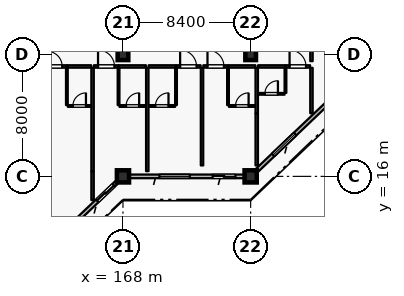
"""IFC4 building model, lengths in metres.
Left out: names, types, materials, properties, quantities, classifications, styles, units other than length and angle.
Written with IfcOpenShell. Run it as: python <this file> out.ifc"""

import sys

from ifc_helpers import new_model, si_unit, direction, frame, frame_2d, origin, origin_2d, place, context, subcontext, project, spatial, rectangle, extrude, element, fill, save


model = new_model("IFC4")
c1 = context("Model", 3, precision=1e-05, world=origin(), true_north=direction((0.0, 1.0)))
c2 = subcontext(c1, "Body", "Model", "MODEL_VIEW")
j1 = project(units=[si_unit("LENGTHUNIT", "METRE"), si_unit("PLANEANGLEUNIT", "RADIAN")], contexts=[c1])
p1 = place(None, origin())
s1 = spatial("IfcSite", under=j1, at=p1, CompositionType="ELEMENT")
p2 = place(p1, origin())
s2 = spatial("IfcBuilding", under=s1, at=p2, CompositionType="ELEMENT")
p3 = place(p2, frame((0.0, 0.0, 25.2)))
s3 = spatial("IfcBuildingStorey", under=s2, at=p3, CompositionType="ELEMENT", Elevation=25.2)
for number, where, z_axis, x_axis in (
    (1, (168.0, 16.0, 0.0), (0.0, 0.0, 1.0), (1.0, 0.0, 0.0)),
    (2, (176.4, 16.0, 0.0), (0.0, 0.0, 1.0), (1.0, 0.0, 0.0)),
):
    element("IfcColumn", number, at=place(p3, frame(where, z_axis=z_axis, x_axis=x_axis)), inside=s3, PredefinedType="COLUMN", context=c2, shape_type="SweptSolid", body=[
        extrude(rectangle(XDim=0.8, YDim=0.8, at=origin_2d()), origin(), (0.0, 0.0, 1.0), 3.6),
    ])
for number, where, z_axis, x_axis in (
    (3, (168.0, 24.0, 0.0), (0.0, 0.0, 1.0), (1.0, 0.0, 0.0)),
    (4, (176.4, 24.0, 0.0), (0.0, 0.0, 1.0), (1.0, 0.0, 0.0)),
):
    element("IfcColumn", number, at=place(p3, frame(where, z_axis=z_axis, x_axis=x_axis)), inside=s3, PredefinedType="COLUMN", context=c2, shape_type="SweptSolid", body=[
        extrude(rectangle(XDim=0.7, YDim=0.7, at=origin_2d()), origin(), (0.0, 0.0, 1.0), 3.6),
    ])
p4 = place(p3, frame((167.6, 15.619, 0.0), z_axis=(0.0, 0.0, 1.0), x_axis=(-0.724156739794, -0.689635422677, 0.0)))
e5 = element("IfcWall", 5, at=p4, inside=s3, PredefinedType="SOLIDWALL", context=c2, shape_type="SweptSolid", body=[
    extrude(rectangle(XDim=10.495, YDim=0.24, at=frame_2d((5.248, 0.0))), origin(), (0.0, 0.0, 1.0), 2.93),
])
p5 = place(p4, frame((0.286, 0.0, 0.0)))
e6 = element("IfcOpeningElement", 6, at=p5, cuts=e5, PredefinedType="OPENING", context=c2, shape_type="SweptSolid", body=[
    extrude(rectangle(XDim=1.5, YDim=2.25, at=frame_2d((0.75, 1.125))), frame((0.0, 0.13, 0.0), z_axis=(0.0, -1.0, 0.0), x_axis=(1.0, 0.0, 0.0)), (0.0, 0.0, 1.0), 0.26),
])
p6 = place(p4, frame((3.757, 0.0, 0.8)))
e7 = element("IfcOpeningElement", 7, at=p6, cuts=e5, PredefinedType="OPENING", context=c2, shape_type="SweptSolid", body=[
    extrude(rectangle(XDim=1.6, YDim=1.6, at=frame_2d((0.8, 0.8))), frame((0.0, 0.13, 0.0), z_axis=(0.0, -1.0, 0.0), x_axis=(1.0, 0.0, 0.0)), (0.0, 0.0, 1.0), 0.26),
])
p7 = place(p4, frame((7.969, 0.0, 0.8)))
e8 = element("IfcOpeningElement", 8, at=p7, cuts=e5, PredefinedType="OPENING", context=c2, shape_type="SweptSolid", body=[
    extrude(rectangle(XDim=1.6, YDim=1.6, at=frame_2d((0.8, 0.8))), frame((0.0, 0.13, 0.0), z_axis=(0.0, -1.0, 0.0), x_axis=(1.0, 0.0, 0.0)), (0.0, 0.0, 1.0), 0.26),
])
p8 = place(p3, frame((176.0, 16.0, 0.0), z_axis=(0.0, 0.0, 1.0), x_axis=(-1.0, 0.0, 0.0)))
e9 = element("IfcWall", 9, at=p8, inside=s3, PredefinedType="SOLIDWALL", context=c2, shape_type="SweptSolid", body=[
    extrude(rectangle(XDim=7.6, YDim=0.24, at=frame_2d((3.8, 0.0))), origin(), (0.0, 0.0, 1.0), 2.89),
])
p9 = place(p8, frame((0.6, 0.0, 0.0)))
e10 = element("IfcOpeningElement", 10, at=p9, cuts=e9, PredefinedType="OPENING", context=c2, shape_type="SweptSolid", body=[
    extrude(rectangle(XDim=1.5, YDim=2.25, at=frame_2d((0.75, 1.125))), frame((0.0, 0.13, 0.0), z_axis=(0.0, -1.0, 0.0), x_axis=(1.0, 0.0, 0.0)), (0.0, 0.0, 1.0), 0.26),
])
p10 = place(p8, frame((3.6, 0.0, 0.8)))
e11 = element("IfcOpeningElement", 11, at=p10, cuts=e9, PredefinedType="OPENING", context=c2, shape_type="SweptSolid", body=[
    extrude(rectangle(XDim=2.0, YDim=1.75, at=frame_2d((1.0, 0.875))), frame((0.0, 0.13, 0.0), z_axis=(0.0, -1.0, 0.0), x_axis=(1.0, 0.0, 0.0)), (0.0, 0.0, 1.0), 0.26),
])
p11 = place(p3, frame((184.4, 23.619, 0.0), z_axis=(0.0, 0.0, 1.0), x_axis=(-0.724145676014, -0.689647040094, 0.0)))
e12 = element("IfcWall", 12, at=p11, inside=s3, PredefinedType="SOLIDWALL", context=c2, shape_type="SweptSolid", body=[
    extrude(rectangle(XDim=10.495, YDim=0.24, at=frame_2d((5.248, 0.0))), origin(), (0.0, 0.0, 1.0), 2.89),
])
p12 = place(p11, frame((2.288, 0.0, 0.0)))
e13 = element("IfcOpeningElement", 13, at=p12, cuts=e12, PredefinedType="OPENING", context=c2, shape_type="SweptSolid", body=[
    extrude(rectangle(XDim=1.5, YDim=2.25, at=frame_2d((0.75, 1.125))), frame((0.0, 0.13, 0.0), z_axis=(0.0, -1.0, 0.0), x_axis=(1.0, 0.0, 0.0)), (0.0, 0.0, 1.0), 0.26),
])
p13 = place(p11, frame((7.009, 0.0, 0.8)))
e14 = element("IfcOpeningElement", 14, at=p13, cuts=e12, PredefinedType="OPENING", context=c2, shape_type="SweptSolid", body=[
    extrude(rectangle(XDim=2.0, YDim=1.75, at=frame_2d((1.0, 0.875))), frame((0.0, 0.13, 0.0), z_axis=(0.0, -1.0, 0.0), x_axis=(1.0, 0.0, 0.0)), (0.0, 0.0, 1.0), 0.26),
])
p14 = place(p3, frame((162.69, 23.23, 0.0), z_axis=(0.0, 0.0, 1.0), x_axis=(1.0, 0.0, 0.0)))
e15 = element("IfcWall", 15, at=p14, inside=s3, PredefinedType="PARTITIONING", context=c2, shape_type="SweptSolid", body=[
    extrude(rectangle(XDim=1.62, YDim=0.16, at=frame_2d((0.81, 0.0))), origin(), (0.0, 0.0, 1.0), 3.335),
])
p15 = place(p14, frame((0.31, 0.0, 0.0)))
e16 = element("IfcOpeningElement", 16, at=p15, cuts=e15, PredefinedType="OPENING", context=c2, shape_type="SweptSolid", body=[
    extrude(rectangle(XDim=1.0, YDim=2.25, at=frame_2d((0.5, 1.125))), frame((0.0, 0.09, 0.0), z_axis=(0.0, -1.0, 0.0), x_axis=(1.0, 0.0, 0.0)), (0.0, 0.0, 1.0), 0.18),
])
p16 = place(p3, frame((164.32, 23.23, 0.0), z_axis=(0.0, 0.0, 1.0), x_axis=(1.0, 0.0, 0.0)))
e17 = element("IfcWall", 17, at=p16, inside=s3, PredefinedType="PARTITIONING", context=c2, shape_type="SweptSolid", body=[
    extrude(rectangle(XDim=1.59, YDim=0.16, at=frame_2d((0.795, 0.0))), origin(), (0.0, 0.0, 1.0), 3.335),
])
p17 = place(p3, frame((164.31, 20.69, 0.0), z_axis=(0.0, 0.0, 1.0), x_axis=(0.0, 1.0, 0.0)))
e18 = element("IfcWall", 18, at=p17, inside=s3, PredefinedType="PARTITIONING", context=c2, shape_type="SweptSolid", body=[
    extrude(rectangle(XDim=2.45, YDim=0.115, at=frame_2d((1.225, 0.0))), origin(), (0.0, 0.0, 1.0), 3.335),
])
p18 = place(p3, frame((164.37, 20.63, 0.0), z_axis=(0.0, 0.0, 1.0), x_axis=(1.0, 0.0, 0.0)))
e19 = element("IfcWall", 19, at=p18, inside=s3, PredefinedType="PARTITIONING", context=c2, shape_type="SweptSolid", body=[
    extrude(rectangle(XDim=1.53, YDim=0.115, at=frame_2d((0.765, 0.0))), origin(), (0.0, 0.0, 1.0), 3.335),
])
p19 = place(p18, frame((0.335, 0.0, 0.0)))
e20 = element("IfcOpeningElement", 20, at=p19, cuts=e19, PredefinedType="OPENING", context=c2, shape_type="SweptSolid", body=[
    extrude(rectangle(XDim=0.86, YDim=2.12, at=frame_2d((0.43, 1.06))), frame((0.0, 0.067, 0.0), z_axis=(0.0, -1.0, 0.0), x_axis=(1.0, 0.0, 0.0)), (0.0, 0.0, 1.0), 0.135),
])
p20 = place(p3, frame((166.0, 14.44, 0.0), z_axis=(0.0, 0.0, 1.0), x_axis=(0.0, 1.0, 0.0)))
e21 = element("IfcWall", 21, at=p20, inside=s3, PredefinedType="PARTITIONING", context=c2, shape_type="SweptSolid", body=[
    extrude(rectangle(XDim=1.89, YDim=0.16, at=frame_2d((0.945, 0.0))), origin(), (0.0, 0.0, 1.0), 3.335),
])
p21 = place(p3, frame((166.09, 23.23, 0.0), z_axis=(0.0, 0.0, 1.0), x_axis=(1.0, 0.0, 0.0)))
e22 = element("IfcWall", 22, at=p21, inside=s3, PredefinedType="PARTITIONING", context=c2, shape_type="SweptSolid", body=[
    extrude(rectangle(XDim=1.62, YDim=0.16, at=frame_2d((0.81, 0.0))), origin(), (0.0, 0.0, 1.0), 3.335),
])
p22 = place(p21, frame((0.27, 0.0, 0.0)))
e23 = element("IfcOpeningElement", 23, at=p22, cuts=e22, PredefinedType="OPENING", context=c2, shape_type="SweptSolid", body=[
    extrude(rectangle(XDim=1.08, YDim=2.3, at=frame_2d((0.54, 1.15))), frame((0.0, 0.09, 0.0), z_axis=(0.0, -1.0, 0.0), x_axis=(1.0, 0.0, 0.0)), (0.0, 0.0, 1.0), 0.18),
])
p23 = place(p3, frame((167.72, 23.23, 0.0), z_axis=(0.0, 0.0, 1.0), x_axis=(1.0, 0.0, 0.0)))
e24 = element("IfcWall", 24, at=p23, inside=s3, PredefinedType="PARTITIONING", context=c2, shape_type="SweptSolid", body=[
    extrude(rectangle(XDim=1.79, YDim=0.16, at=frame_2d((0.895, 0.0))), origin(), (0.0, 0.0, 1.0), 3.335),
])
p24 = place(p3, frame((167.71, 20.69, 0.0), z_axis=(0.0, 0.0, 1.0), x_axis=(0.0, 1.0, 0.0)))
e25 = element("IfcWall", 25, at=p24, inside=s3, PredefinedType="PARTITIONING", context=c2, shape_type="SweptSolid", body=[
    extrude(rectangle(XDim=2.45, YDim=0.115, at=frame_2d((1.225, 0.0))), origin(), (0.0, 0.0, 1.0), 3.335),
])
p25 = place(p3, frame((167.77, 20.63, 0.0), z_axis=(0.0, 0.0, 1.0), x_axis=(1.0, 0.0, 0.0)))
e26 = element("IfcWall", 26, at=p25, inside=s3, PredefinedType="PARTITIONING", context=c2, shape_type="SweptSolid", body=[
    extrude(rectangle(XDim=1.73, YDim=0.115, at=frame_2d((0.865, 0.0))), origin(), (0.0, 0.0, 1.0), 3.335),
])
p26 = place(p25, frame((0.435, 0.0, 0.0)))
e27 = element("IfcOpeningElement", 27, at=p26, cuts=e26, PredefinedType="OPENING", context=c2, shape_type="SweptSolid", body=[
    extrude(rectangle(XDim=0.86, YDim=2.12, at=frame_2d((0.43, 1.06))), frame((0.0, 0.067, 0.0), z_axis=(0.0, -1.0, 0.0), x_axis=(1.0, 0.0, 0.0)), (0.0, 0.0, 1.0), 0.135),
])
p27 = place(p3, frame((166.0, 16.34, 0.0), z_axis=(0.0, 0.0, 1.0), x_axis=(0.0, 1.0, 0.0)))
e28 = element("IfcWall", 28, at=p27, inside=s3, PredefinedType="PARTITIONING", context=c2, shape_type="SweptSolid", body=[
    extrude(rectangle(XDim=6.8, YDim=0.16, at=frame_2d((3.4, 0.0))), origin(), (0.0, 0.0, 1.0), 3.335),
])
p28 = place(p3, frame((169.69, 23.23, 0.0), z_axis=(0.0, 0.0, 1.0), x_axis=(1.0, 0.0, 0.0)))
e29 = element("IfcWall", 29, at=p28, inside=s3, PredefinedType="PARTITIONING", context=c2, shape_type="SweptSolid", body=[
    extrude(rectangle(XDim=1.79, YDim=0.16, at=frame_2d((0.895, 0.0))), origin(), (0.0, 0.0, 1.0), 3.335),
])
p29 = place(p3, frame((171.49, 23.23, 0.0), z_axis=(0.0, 0.0, 1.0), x_axis=(1.0, 0.0, 0.0)))
e30 = element("IfcWall", 30, at=p29, inside=s3, PredefinedType="PARTITIONING", context=c2, shape_type="SweptSolid", body=[
    extrude(rectangle(XDim=1.62, YDim=0.16, at=frame_2d((0.81, 0.0))), origin(), (0.0, 0.0, 1.0), 3.335),
])
p30 = place(p29, frame((0.27, 0.0, 0.0)))
e31 = element("IfcOpeningElement", 31, at=p30, cuts=e30, PredefinedType="OPENING", context=c2, shape_type="SweptSolid", body=[
    extrude(rectangle(XDim=1.08, YDim=2.3, at=frame_2d((0.54, 1.15))), frame((0.0, 0.09, 0.0), z_axis=(0.0, -1.0, 0.0), x_axis=(1.0, 0.0, 0.0)), (0.0, 0.0, 1.0), 0.18),
])
p31 = place(p3, frame((171.49, 20.69, 0.0), z_axis=(0.0, 0.0, 1.0), x_axis=(0.0, 1.0, 0.0)))
e32 = element("IfcWall", 32, at=p31, inside=s3, PredefinedType="PARTITIONING", context=c2, shape_type="SweptSolid", body=[
    extrude(rectangle(XDim=2.45, YDim=0.115, at=frame_2d((1.225, 0.0))), origin(), (0.0, 0.0, 1.0), 3.335),
])
p32 = place(p3, frame((169.7, 20.63, 0.0), z_axis=(0.0, 0.0, 1.0), x_axis=(1.0, 0.0, 0.0)))
e33 = element("IfcWall", 33, at=p32, inside=s3, PredefinedType="PARTITIONING", context=c2, shape_type="SweptSolid", body=[
    extrude(rectangle(XDim=1.73, YDim=0.115, at=frame_2d((0.865, 0.0))), origin(), (0.0, 0.0, 1.0), 3.335),
])
p33 = place(p32, frame((0.435, 0.0, 0.0)))
e34 = element("IfcOpeningElement", 34, at=p33, cuts=e33, PredefinedType="OPENING", context=c2, shape_type="SweptSolid", body=[
    extrude(rectangle(XDim=0.86, YDim=2.12, at=frame_2d((0.43, 1.06))), frame((0.0, 0.067, 0.0), z_axis=(0.0, -1.0, 0.0), x_axis=(1.0, 0.0, 0.0)), (0.0, 0.0, 1.0), 0.135),
])
p34 = place(p3, frame((169.6, 16.34, 0.0), z_axis=(0.0, 0.0, 1.0), x_axis=(0.0, 1.0, 0.0)))
e35 = element("IfcWall", 35, at=p34, inside=s3, PredefinedType="PARTITIONING", context=c2, shape_type="SweptSolid", body=[
    extrude(rectangle(XDim=6.8, YDim=0.16, at=frame_2d((3.4, 0.0))), origin(), (0.0, 0.0, 1.0), 3.335),
])
p35 = place(p3, frame((173.29, 23.23, 0.0), z_axis=(0.0, 0.0, 1.0), x_axis=(1.0, 0.0, 0.0)))
e36 = element("IfcWall", 36, at=p35, inside=s3, PredefinedType="PARTITIONING", context=c2, shape_type="SweptSolid", body=[
    extrude(rectangle(XDim=1.62, YDim=0.16, at=frame_2d((0.81, 0.0))), origin(), (0.0, 0.0, 1.0), 3.335),
])
p36 = place(p35, frame((0.27, 0.0, 0.0)))
e37 = element("IfcOpeningElement", 37, at=p36, cuts=e36, PredefinedType="OPENING", context=c2, shape_type="SweptSolid", body=[
    extrude(rectangle(XDim=1.08, YDim=2.3, at=frame_2d((0.54, 1.15))), frame((0.0, 0.09, 0.0), z_axis=(0.0, -1.0, 0.0), x_axis=(1.0, 0.0, 0.0)), (0.0, 0.0, 1.0), 0.18),
])
p37 = place(p3, frame((174.92, 23.23, 0.0), z_axis=(0.0, 0.0, 1.0), x_axis=(1.0, 0.0, 0.0)))
e38 = element("IfcWall", 38, at=p37, inside=s3, PredefinedType="PARTITIONING", context=c2, shape_type="SweptSolid", body=[
    extrude(rectangle(XDim=1.79, YDim=0.16, at=frame_2d((0.895, 0.0))), origin(), (0.0, 0.0, 1.0), 3.335),
])
p38 = place(p3, frame((174.91, 20.69, 0.0), z_axis=(0.0, 0.0, 1.0), x_axis=(0.0, 1.0, 0.0)))
e39 = element("IfcWall", 39, at=p38, inside=s3, PredefinedType="PARTITIONING", context=c2, shape_type="SweptSolid", body=[
    extrude(rectangle(XDim=2.45, YDim=0.115, at=frame_2d((1.225, 0.0))), origin(), (0.0, 0.0, 1.0), 3.335),
])
p39 = place(p3, frame((174.97, 20.63, 0.0), z_axis=(0.0, 0.0, 1.0), x_axis=(1.0, 0.0, 0.0)))
e40 = element("IfcWall", 40, at=p39, inside=s3, PredefinedType="PARTITIONING", context=c2, shape_type="SweptSolid", body=[
    extrude(rectangle(XDim=1.73, YDim=0.115, at=frame_2d((0.865, 0.0))), origin(), (0.0, 0.0, 1.0), 3.335),
])
p40 = place(p39, frame((0.435, 0.0, 0.0)))
e41 = element("IfcOpeningElement", 41, at=p40, cuts=e40, PredefinedType="OPENING", context=c2, shape_type="SweptSolid", body=[
    extrude(rectangle(XDim=0.86, YDim=2.12, at=frame_2d((0.43, 1.06))), frame((0.0, 0.067, 0.0), z_axis=(0.0, -1.0, 0.0), x_axis=(1.0, 0.0, 0.0)), (0.0, 0.0, 1.0), 0.135),
])
p41 = place(p3, frame((173.2, 16.72, 0.0), z_axis=(0.0, 0.0, 1.0), x_axis=(0.0, 1.0, 0.0)))
e42 = element("IfcWall", 42, at=p41, inside=s3, PredefinedType="PARTITIONING", context=c2, shape_type="SweptSolid", body=[
    extrude(rectangle(XDim=6.42, YDim=0.16, at=frame_2d((3.21, 0.0))), origin(), (0.0, 0.0, 1.0), 3.335),
])
p42 = place(p3, frame((176.8, 16.72, 0.0), z_axis=(0.0, 0.0, 1.0), x_axis=(0.0, 1.0, 0.0)))
e43 = element("IfcWall", 43, at=p42, inside=s3, PredefinedType="PARTITIONING", context=c2, shape_type="SweptSolid", body=[
    extrude(rectangle(XDim=3.42, YDim=0.16, at=frame_2d((1.71, 0.0))), origin(), (0.0, 0.0, 1.0), 3.335),
])
p43 = place(p3, frame((176.89, 23.23, 0.0), z_axis=(0.0, 0.0, 1.0), x_axis=(1.0, 0.0, 0.0)))
e44 = element("IfcWall", 44, at=p43, inside=s3, PredefinedType="PARTITIONING", context=c2, shape_type="SweptSolid", body=[
    extrude(rectangle(XDim=1.79, YDim=0.16, at=frame_2d((0.895, 0.0))), origin(), (0.0, 0.0, 1.0), 3.335),
])
p44 = place(p3, frame((178.69, 23.23, 0.0), z_axis=(0.0, 0.0, 1.0), x_axis=(1.0, 0.0, 0.0)))
e45 = element("IfcWall", 45, at=p44, inside=s3, PredefinedType="PARTITIONING", context=c2, shape_type="SweptSolid", body=[
    extrude(rectangle(XDim=1.62, YDim=0.16, at=frame_2d((0.81, 0.0))), origin(), (0.0, 0.0, 1.0), 3.335),
])
p45 = place(p44, frame((0.27, 0.0, 0.0)))
e46 = element("IfcOpeningElement", 46, at=p45, cuts=e45, PredefinedType="OPENING", context=c2, shape_type="SweptSolid", body=[
    extrude(rectangle(XDim=1.08, YDim=2.3, at=frame_2d((0.54, 1.15))), frame((0.0, 0.09, 0.0), z_axis=(0.0, -1.0, 0.0), x_axis=(1.0, 0.0, 0.0)), (0.0, 0.0, 1.0), 0.18),
])
p46 = place(p3, frame((178.69, 21.49, 0.0), z_axis=(0.0, 0.0, 1.0), x_axis=(0.0, 1.0, 0.0)))
e47 = element("IfcWall", 47, at=p46, inside=s3, PredefinedType="PARTITIONING", context=c2, shape_type="SweptSolid", body=[
    extrude(rectangle(XDim=1.65, YDim=0.115, at=frame_2d((0.825, 0.0))), origin(), (0.0, 0.0, 1.0), 3.335),
])
p47 = place(p3, frame((176.9, 21.43, 0.0), z_axis=(0.0, 0.0, 1.0), x_axis=(1.0, 0.0, 0.0)))
e48 = element("IfcWall", 48, at=p47, inside=s3, PredefinedType="PARTITIONING", context=c2, shape_type="SweptSolid", body=[
    extrude(rectangle(XDim=1.73, YDim=0.115, at=frame_2d((0.865, 0.0))), origin(), (0.0, 0.0, 1.0), 3.335),
])
p48 = place(p47, frame((0.435, 0.0, 0.0)))
e49 = element("IfcOpeningElement", 49, at=p48, cuts=e48, PredefinedType="OPENING", context=c2, shape_type="SweptSolid", body=[
    extrude(rectangle(XDim=0.86, YDim=2.12, at=frame_2d((0.43, 1.06))), frame((0.0, 0.067, 0.0), z_axis=(0.0, -1.0, 0.0), x_axis=(1.0, 0.0, 0.0)), (0.0, 0.0, 1.0), 0.135),
])
for number, where, z_axis, x_axis in (
    (50, (176.8, 20.15, 0.0), (0.0, 0.0, 1.0), (0.0, 1.0, 0.0)),
    (51, (180.4, 20.15, 0.0), (0.0, 0.0, 1.0), (0.0, 1.0, 0.0)),
):
    element("IfcWall", number, at=place(p3, frame(where, z_axis=z_axis, x_axis=x_axis)), inside=s3, PredefinedType="PARTITIONING", context=c2, shape_type="SweptSolid", body=[
        extrude(rectangle(XDim=2.99, YDim=0.16, at=frame_2d((1.495, 0.0))), origin(), (0.0, 0.0, 1.0), 3.335),
    ])
p49 = place(p3, frame((180.4, 23.58, 0.0), z_axis=(0.0, 0.0, 1.0), x_axis=(0.0, 1.0, 0.0)))
e52 = element("IfcWall", 52, at=p49, inside=s3, PredefinedType="PARTITIONING", context=c2, shape_type="SweptSolid", body=[
    extrude(rectangle(XDim=7.56, YDim=0.16, at=frame_2d((3.78, 0.0))), origin(), (0.0, 0.0, 1.0), 3.335),
])
p50 = place(p5, origin())
e53 = element("IfcDoor", 53, at=p50, inside=s3, OperationType="SLIDING_TO_LEFT", PredefinedType="DOOR", context=c2, shape_type="SweptSolid", body=[
    extrude(rectangle(XDim=1.5, YDim=2.25, at=frame_2d((0.75, 1.125))), frame((0.0, 0.025, 0.0), z_axis=(0.0, -1.0, 0.0), x_axis=(1.0, 0.0, 0.0)), (0.0, 0.0, 1.0), 0.05),
])
fill(e6, e53)
p51 = place(p9, origin())
e54 = element("IfcDoor", 54, at=p51, inside=s3, OperationType="SLIDING_TO_LEFT", PredefinedType="DOOR", context=c2, shape_type="SweptSolid", body=[
    extrude(rectangle(XDim=1.5, YDim=2.25, at=frame_2d((0.75, 1.125))), frame((0.0, 0.025, 0.0), z_axis=(0.0, -1.0, 0.0), x_axis=(1.0, 0.0, 0.0)), (0.0, 0.0, 1.0), 0.05),
])
fill(e10, e54)
p52 = place(p10, origin())
e55 = element("IfcWindow", 55, at=p52, inside=s3, PartitioningType="DOUBLE_PANEL_VERTICAL", PredefinedType="WINDOW", context=c2, shape_type="SweptSolid", body=[
    extrude(rectangle(XDim=2.0, YDim=1.75, at=frame_2d((1.0, 0.875))), frame((0.0, 0.03, 0.0), z_axis=(0.0, -1.0, 0.0), x_axis=(1.0, 0.0, 0.0)), (0.0, 0.0, 1.0), 0.06),
])
fill(e11, e55)
p53 = place(p13, origin())
e56 = element("IfcWindow", 56, at=p53, inside=s3, PartitioningType="DOUBLE_PANEL_VERTICAL", PredefinedType="WINDOW", context=c2, shape_type="SweptSolid", body=[
    extrude(rectangle(XDim=2.0, YDim=1.75, at=frame_2d((1.0, 0.875))), frame((0.0, 0.03, 0.0), z_axis=(0.0, -1.0, 0.0), x_axis=(1.0, 0.0, 0.0)), (0.0, 0.0, 1.0), 0.06),
])
fill(e14, e56)
p54 = place(p15, origin())
e57 = element("IfcDoor", 57, at=p54, inside=s3, OperationType="SINGLE_SWING_LEFT", PredefinedType="DOOR", context=c2, shape_type="SweptSolid", body=[
    extrude(rectangle(XDim=1.0, YDim=2.25, at=frame_2d((0.5, 1.125))), frame((0.0, 0.025, 0.0), z_axis=(0.0, -1.0, 0.0), x_axis=(1.0, 0.0, 0.0)), (0.0, 0.0, 1.0), 0.05),
])
fill(e16, e57)
p55 = place(p19, origin())
e58 = element("IfcDoor", 58, at=p55, inside=s3, OperationType="SINGLE_SWING_RIGHT", PredefinedType="DOOR", context=c2, shape_type="SweptSolid", body=[
    extrude(rectangle(XDim=0.86, YDim=2.12, at=frame_2d((0.43, 1.06))), frame((0.0, 0.025, 0.0), z_axis=(0.0, -1.0, 0.0), x_axis=(1.0, 0.0, 0.0)), (0.0, 0.0, 1.0), 0.05),
])
fill(e20, e58)
p56 = place(p22, origin())
e59 = element("IfcDoor", 59, at=p56, inside=s3, OperationType="SINGLE_SWING_LEFT", PredefinedType="DOOR", context=c2, shape_type="SweptSolid", body=[
    extrude(rectangle(XDim=1.08, YDim=2.3, at=frame_2d((0.54, 1.15))), frame((0.0, 0.025, 0.0), z_axis=(0.0, -1.0, 0.0), x_axis=(1.0, 0.0, 0.0)), (0.0, 0.0, 1.0), 0.05),
])
fill(e23, e59)
p57 = place(p26, origin())
e60 = element("IfcDoor", 60, at=p57, inside=s3, OperationType="SINGLE_SWING_RIGHT", PredefinedType="DOOR", context=c2, shape_type="SweptSolid", body=[
    extrude(rectangle(XDim=0.86, YDim=2.12, at=frame_2d((0.43, 1.06))), frame((0.0, 0.025, 0.0), z_axis=(0.0, -1.0, 0.0), x_axis=(1.0, 0.0, 0.0)), (0.0, 0.0, 1.0), 0.05),
])
fill(e27, e60)
p58 = place(p30, origin())
e61 = element("IfcDoor", 61, at=p58, inside=s3, OperationType="SINGLE_SWING_LEFT", PredefinedType="DOOR", context=c2, shape_type="SweptSolid", body=[
    extrude(rectangle(XDim=1.08, YDim=2.3, at=frame_2d((0.54, 1.15))), frame((0.0, 0.025, 0.0), z_axis=(0.0, -1.0, 0.0), x_axis=(1.0, 0.0, 0.0)), (0.0, 0.0, 1.0), 0.05),
])
fill(e31, e61)
p59 = place(p33, origin())
e62 = element("IfcDoor", 62, at=p59, inside=s3, OperationType="SINGLE_SWING_RIGHT", PredefinedType="DOOR", context=c2, shape_type="SweptSolid", body=[
    extrude(rectangle(XDim=0.86, YDim=2.12, at=frame_2d((0.43, 1.06))), frame((0.0, 0.025, 0.0), z_axis=(0.0, -1.0, 0.0), x_axis=(1.0, 0.0, 0.0)), (0.0, 0.0, 1.0), 0.05),
])
fill(e34, e62)
p60 = place(p36, origin())
e63 = element("IfcDoor", 63, at=p60, inside=s3, OperationType="SINGLE_SWING_LEFT", PredefinedType="DOOR", context=c2, shape_type="SweptSolid", body=[
    extrude(rectangle(XDim=1.08, YDim=2.3, at=frame_2d((0.54, 1.15))), frame((0.0, 0.025, 0.0), z_axis=(0.0, -1.0, 0.0), x_axis=(1.0, 0.0, 0.0)), (0.0, 0.0, 1.0), 0.05),
])
fill(e37, e63)
p61 = place(p40, origin())
e64 = element("IfcDoor", 64, at=p61, inside=s3, OperationType="SINGLE_SWING_RIGHT", PredefinedType="DOOR", context=c2, shape_type="SweptSolid", body=[
    extrude(rectangle(XDim=0.86, YDim=2.12, at=frame_2d((0.43, 1.06))), frame((0.0, 0.025, 0.0), z_axis=(0.0, -1.0, 0.0), x_axis=(1.0, 0.0, 0.0)), (0.0, 0.0, 1.0), 0.05),
])
fill(e41, e64)
p62 = place(p45, origin())
e65 = element("IfcDoor", 65, at=p62, inside=s3, OperationType="SINGLE_SWING_LEFT", PredefinedType="DOOR", context=c2, shape_type="SweptSolid", body=[
    extrude(rectangle(XDim=1.08, YDim=2.3, at=frame_2d((0.54, 1.15))), frame((0.0, 0.025, 0.0), z_axis=(0.0, -1.0, 0.0), x_axis=(1.0, 0.0, 0.0)), (0.0, 0.0, 1.0), 0.05),
])
fill(e46, e65)
p63 = place(p48, origin())
e66 = element("IfcDoor", 66, at=p63, inside=s3, OperationType="SINGLE_SWING_RIGHT", PredefinedType="DOOR", context=c2, shape_type="SweptSolid", body=[
    extrude(rectangle(XDim=0.86, YDim=2.12, at=frame_2d((0.43, 1.06))), frame((0.0, 0.025, 0.0), z_axis=(0.0, -1.0, 0.0), x_axis=(1.0, 0.0, 0.0)), (0.0, 0.0, 1.0), 0.05),
])
fill(e49, e66)
save(model, sys.argv[1])
